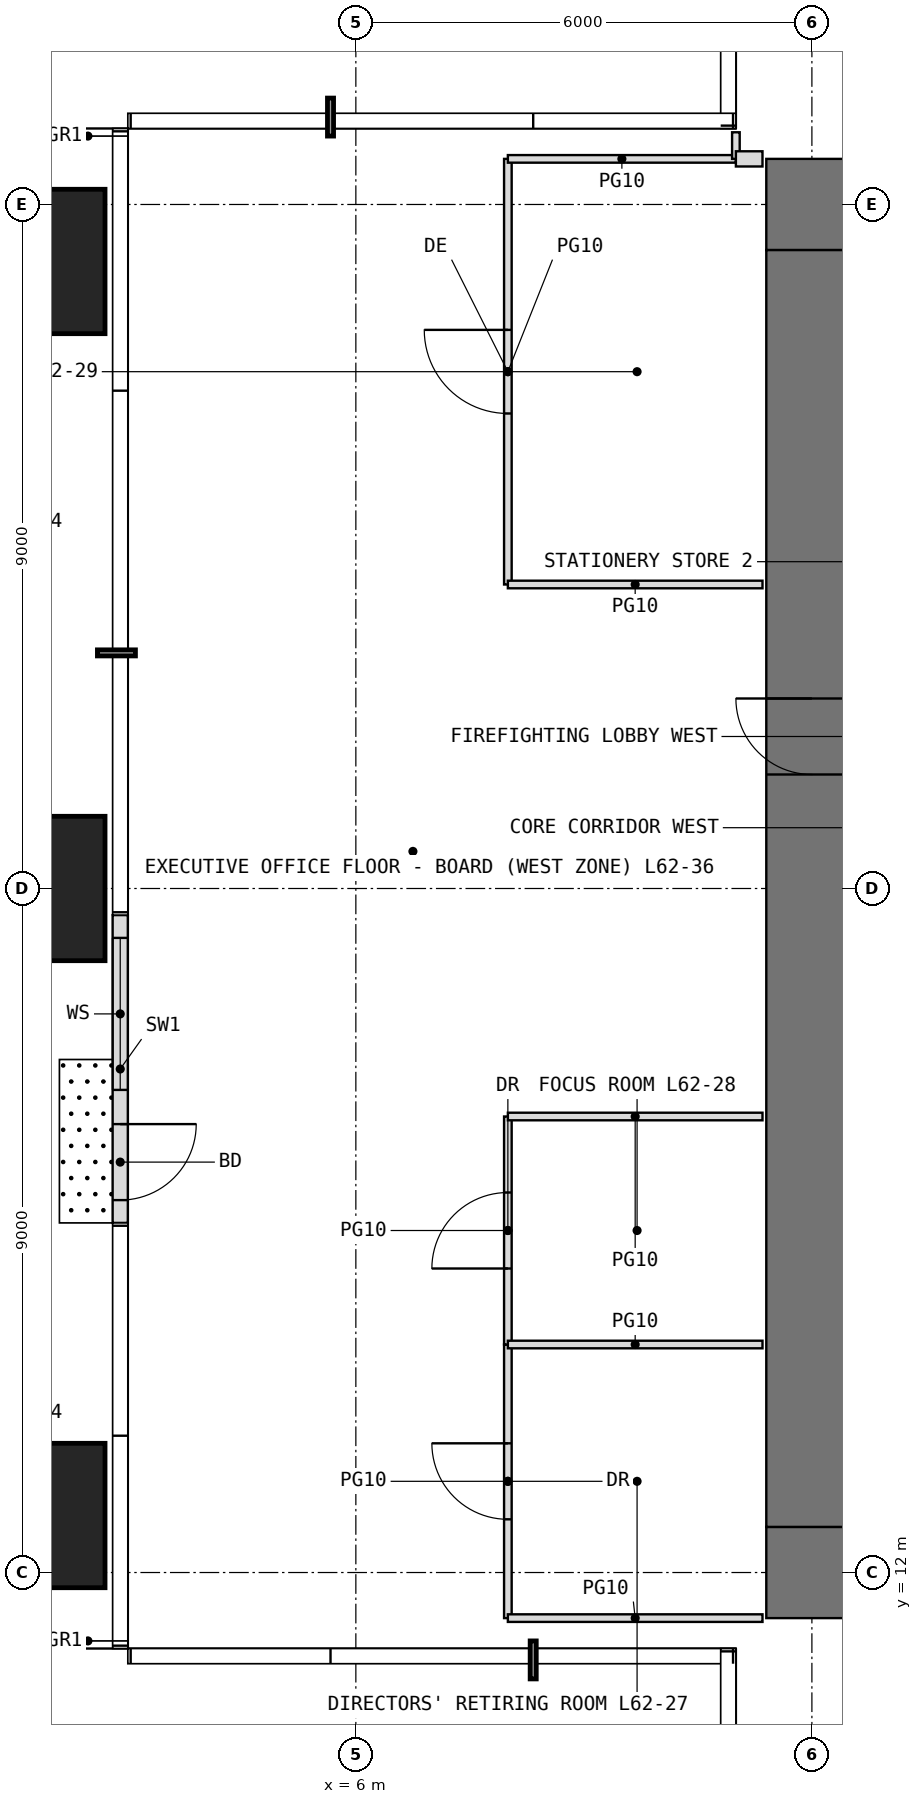
"""IFC4 building model, lengths in metres.
Left out: names, types, materials, properties, quantities, classifications, styles, units other than length and angle.
Written with IfcOpenShell. Run it as: python <this file> out.ifc"""

import sys

from ifc_helpers import new_model, si_unit, direction, frame, frame_2d, origin, origin_2d, place, context, subcontext, project, spatial, rectangle, extrude, element, fill, save


model = new_model("IFC4")
c1 = context("Model", 3, precision=1e-05, world=origin(), true_north=direction((0.0, 1.0)))
c2 = subcontext(c1, "Body", "Model", "MODEL_VIEW")
j1 = project(units=[si_unit("LENGTHUNIT", "METRE"), si_unit("PLANEANGLEUNIT", "RADIAN")], contexts=[c1])
p1 = place(None, origin())
s1 = spatial("IfcSite", under=j1, at=p1, CompositionType="ELEMENT")
p2 = place(p1, origin())
s2 = spatial("IfcBuilding", under=s1, at=p2, CompositionType="ELEMENT")
p3 = place(p2, frame((0.0, 0.0, 260.8)))
s3 = spatial("IfcBuildingStorey", under=s2, at=p3, CompositionType="ELEMENT", Elevation=260.8)
for number, where, z_axis, x_axis in (
    (1, (1.75, 12.75, 0.0), (0.0, 0.0, 1.0), (1.0, 0.0, 0.0)),
    (2, (1.75, 21.0, 0.0), (0.0, 0.0, 1.0), (1.0, 0.0, 0.0)),
    (3, (1.75, 29.25, 0.0), (0.0, 0.0, 1.0), (1.0, 0.0, 0.0)),
):
    element("IfcColumn", number, at=place(p3, frame(where, z_axis=z_axis, x_axis=x_axis)), inside=s3, PredefinedType="COLUMN", context=c2, shape_type="SweptSolid", body=[
        extrude(rectangle(XDim=1.9, YDim=1.9, at=origin_2d()), origin(), (0.0, 0.0, 1.0), 4.2),
    ])
p4 = place(p3, frame((2.9, 20.65, 0.0), z_axis=(0.0, 0.0, 1.0), x_axis=(0.0, -1.0, 0.0)))
e4 = element("IfcWall", 4, at=p4, inside=s3, PredefinedType="USERDEFINED", context=c2, shape_type="SweptSolid", body=[
    extrude(rectangle(XDim=4.05, YDim=0.2, at=frame_2d((2.025, 0.0))), origin(), (0.0, 0.0, 1.0), 3.95),
])
p5 = place(p4, frame((2.75, 0.0, 0.0)))
e5 = element("IfcOpeningElement", 5, at=p5, cuts=e4, PredefinedType="OPENING", context=c2, shape_type="SweptSolid", body=[
    extrude(rectangle(XDim=1.0, YDim=2.4, at=frame_2d((0.5, 1.2))), frame((0.0, 0.11, 0.0), z_axis=(0.0, -1.0, 0.0), x_axis=(1.0, 0.0, 0.0)), (0.0, 0.0, 1.0), 0.22),
])
p6 = place(p4, frame((0.3, 0.0, 0.3)))
e6 = element("IfcOpeningElement", 6, at=p6, cuts=e4, PredefinedType="OPENING", context=c2, shape_type="SweptSolid", body=[
    extrude(rectangle(XDim=2.0, YDim=2.7, at=frame_2d((1.0, 1.35))), frame((0.0, 0.11, 0.0), z_axis=(0.0, -1.0, 0.0), x_axis=(1.0, 0.0, 0.0)), (0.0, 0.0, 1.0), 0.22),
])
p7 = place(p3, frame((11.4, 12.0, -0.05), z_axis=(0.0, 0.0, 1.0), x_axis=(1.0, 0.0, 0.0)))
e7 = element("IfcWall", 7, at=p7, inside=s3, PredefinedType="SHEAR", context=c2, shape_type="SweptSolid", body=[
    extrude(rectangle(XDim=19.2, YDim=1.2, at=frame_2d((9.6, 0.0))), origin(), (0.0, 0.0, 1.0), 4.2),
])
p8 = place(p7, frame((8.6, 0.0, 0.05)))
e8 = element("IfcOpeningElement", 8, at=p8, cuts=e7, PredefinedType="OPENING", context=c2, shape_type="SweptSolid", body=[
    extrude(rectangle(XDim=2.0, YDim=2.2, at=frame_2d((1.0, 1.1))), frame((0.0, 0.61, 0.0), z_axis=(0.0, -1.0, 0.0), x_axis=(1.0, 0.0, 0.0)), (0.0, 0.0, 1.0), 1.22),
])
p9 = place(p3, frame((11.4, 30.0, -0.05), z_axis=(0.0, 0.0, 1.0), x_axis=(1.0, 0.0, 0.0)))
e9 = element("IfcWall", 9, at=p9, inside=s3, PredefinedType="SHEAR", context=c2, shape_type="SweptSolid", body=[
    extrude(rectangle(XDim=19.2, YDim=1.2, at=frame_2d((9.6, 0.0))), origin(), (0.0, 0.0, 1.0), 4.2),
])
p10 = place(p9, frame((8.6, 0.0, 0.05)))
e10 = element("IfcOpeningElement", 10, at=p10, cuts=e9, PredefinedType="OPENING", context=c2, shape_type="SweptSolid", body=[
    extrude(rectangle(XDim=2.0, YDim=2.2, at=frame_2d((1.0, 1.1))), frame((0.0, 0.61, 0.0), z_axis=(0.0, -1.0, 0.0), x_axis=(1.0, 0.0, 0.0)), (0.0, 0.0, 1.0), 1.22),
])
p11 = place(p3, frame((12.0, 12.6, -0.05), z_axis=(0.0, 0.0, 1.0), x_axis=(0.0, 1.0, 0.0)))
e11 = element("IfcWall", 11, at=p11, inside=s3, PredefinedType="SHEAR", context=c2, shape_type="SweptSolid", body=[
    extrude(rectangle(XDim=16.8, YDim=1.2, at=frame_2d((8.4, 0.0))), origin(), (0.0, 0.0, 1.0), 4.2),
])
p12 = place(p11, frame((9.9, 0.0, 0.05)))
e12 = element("IfcOpeningElement", 12, at=p12, cuts=e11, PredefinedType="OPENING", context=c2, shape_type="SweptSolid", body=[
    extrude(rectangle(XDim=1.0, YDim=2.2, at=frame_2d((0.5, 1.1))), frame((0.0, 0.61, 0.0), z_axis=(0.0, -1.0, 0.0), x_axis=(1.0, 0.0, 0.0)), (0.0, 0.0, 1.0), 1.22),
])
p13 = place(p3, frame((8.0, 11.4, 0.0), z_axis=(0.0, 0.0, 1.0), x_axis=(0.0, 1.0, 0.0)))
e13 = element("IfcWall", 13, at=p13, inside=s3, PredefinedType="PARTITIONING", context=c2, shape_type="SweptSolid", body=[
    extrude(rectangle(XDim=3.6, YDim=0.1, at=frame_2d((1.8, 0.0))), origin(), (0.0, 0.0, 1.0), 3.95),
])
p14 = place(p13, frame((1.3, 0.0, 0.0)))
e14 = element("IfcOpeningElement", 14, at=p14, cuts=e13, PredefinedType="OPENING", context=c2, shape_type="SweptSolid", body=[
    extrude(rectangle(XDim=1.0, YDim=2.2, at=frame_2d((0.5, 1.1))), frame((0.0, 0.06, 0.0), z_axis=(0.0, -1.0, 0.0), x_axis=(1.0, 0.0, 0.0)), (0.0, 0.0, 1.0), 0.12),
])
p15 = place(p3, frame((8.0, 11.4, 0.0), z_axis=(0.0, 0.0, 1.0), x_axis=(1.0, 0.0, 0.0)))
e15 = element("IfcWall", 15, at=p15, inside=s3, PredefinedType="PARTITIONING", context=c2, shape_type="SweptSolid", body=[
    extrude(rectangle(XDim=3.35, YDim=0.1, at=frame_2d((1.675, 0.0))), origin(), (0.0, 0.0, 1.0), 3.95),
])
p16 = place(p3, frame((8.0, 15.0, 0.0), z_axis=(0.0, 0.0, 1.0), x_axis=(0.0, 1.0, 0.0)))
e16 = element("IfcWall", 16, at=p16, inside=s3, PredefinedType="PARTITIONING", context=c2, shape_type="SweptSolid", body=[
    extrude(rectangle(XDim=3.0, YDim=0.1, at=frame_2d((1.5, 0.0))), origin(), (0.0, 0.0, 1.0), 3.95),
])
p17 = place(p16, frame((1.0, 0.0, 0.0)))
e17 = element("IfcOpeningElement", 17, at=p17, cuts=e16, PredefinedType="OPENING", context=c2, shape_type="SweptSolid", body=[
    extrude(rectangle(XDim=1.0, YDim=2.2, at=frame_2d((0.5, 1.1))), frame((0.0, 0.06, 0.0), z_axis=(0.0, -1.0, 0.0), x_axis=(1.0, 0.0, 0.0)), (0.0, 0.0, 1.0), 0.12),
])
for number, where, z_axis, x_axis in (
    (18, (8.0, 15.0, 0.0), (0.0, 0.0, 1.0), (1.0, 0.0, 0.0)),
    (19, (8.0, 18.0, 0.0), (0.0, 0.0, 1.0), (1.0, 0.0, 0.0)),
):
    element("IfcWall", number, at=place(p3, frame(where, z_axis=z_axis, x_axis=x_axis)), inside=s3, PredefinedType="PARTITIONING", context=c2, shape_type="SweptSolid", body=[
        extrude(rectangle(XDim=3.35, YDim=0.1, at=frame_2d((1.675, 0.0))), origin(), (0.0, 0.0, 1.0), 3.95),
    ])
p18 = place(p3, frame((8.0, 25.0, 0.0), z_axis=(0.0, 0.0, 1.0), x_axis=(0.0, 1.0, 0.0)))
e20 = element("IfcWall", 20, at=p18, inside=s3, PredefinedType="PARTITIONING", context=c2, shape_type="SweptSolid", body=[
    extrude(rectangle(XDim=5.6, YDim=0.1, at=frame_2d((2.8, 0.0))), origin(), (0.0, 0.0, 1.0), 3.95),
])
p19 = place(p18, frame((2.25, 0.0, 0.0)))
e21 = element("IfcOpeningElement", 21, at=p19, cuts=e20, PredefinedType="OPENING", context=c2, shape_type="SweptSolid", body=[
    extrude(rectangle(XDim=1.1, YDim=2.3, at=frame_2d((0.55, 1.15))), frame((0.0, 0.06, 0.0), z_axis=(0.0, -1.0, 0.0), x_axis=(1.0, 0.0, 0.0)), (0.0, 0.0, 1.0), 0.12),
])
p20 = place(p3, frame((8.0, 25.0, 0.0), z_axis=(0.0, 0.0, 1.0), x_axis=(1.0, 0.0, 0.0)))
e22 = element("IfcWall", 22, at=p20, inside=s3, PredefinedType="PARTITIONING", context=c2, shape_type="SweptSolid", body=[
    extrude(rectangle(XDim=3.35, YDim=0.1, at=frame_2d((1.675, 0.0))), origin(), (0.0, 0.0, 1.0), 3.95),
])
p21 = place(p3, frame((8.0, 30.6, 0.0), z_axis=(0.0, 0.0, 1.0), x_axis=(1.0, 0.0, 0.0)))
e23 = element("IfcWall", 23, at=p21, inside=s3, PredefinedType="PARTITIONING", context=c2, shape_type="SweptSolid", body=[
    extrude(rectangle(XDim=3.0, YDim=0.1, at=frame_2d((1.5, 0.0))), origin(), (0.0, 0.0, 1.0), 3.95),
])
p22 = place(p3, frame((11.0, 30.6, 0.0), z_axis=(0.0, 0.0, 1.0), x_axis=(0.0, 1.0, 0.0)))
e24 = element("IfcWall", 24, at=p22, inside=s3, PredefinedType="PARTITIONING", context=c2, shape_type="SweptSolid", body=[
    extrude(rectangle(XDim=0.35, YDim=0.1, at=frame_2d((0.175, 0.0))), origin(), (0.0, 0.0, 1.0), 3.95),
])
p23 = place(p3, frame((11.0, 30.6, 0.0), z_axis=(0.0, 0.0, 1.0), x_axis=(1.0, 0.0, 0.0)))
e25 = element("IfcWall", 25, at=p23, inside=s3, PredefinedType="PARTITIONING", context=c2, shape_type="SweptSolid", body=[
    extrude(rectangle(XDim=0.35, YDim=0.2, at=frame_2d((0.175, 0.0))), origin(), (0.0, 0.0, 1.0), 3.95),
])
p24 = place(p5, origin())
e26 = element("IfcDoor", 26, at=p24, inside=s3, OperationType="SINGLE_SWING_LEFT", PredefinedType="DOOR", context=c2, shape_type="SweptSolid", body=[
    extrude(rectangle(XDim=1.0, YDim=2.4, at=frame_2d((0.5, 1.2))), frame((0.0, 0.025, 0.0), z_axis=(0.0, -1.0, 0.0), x_axis=(1.0, 0.0, 0.0)), (0.0, 0.0, 1.0), 0.05),
])
fill(e5, e26)
p25 = place(p6, origin())
e27 = element("IfcWindow", 27, at=p25, inside=s3, PartitioningType="SINGLE_PANEL", PredefinedType="WINDOW", context=c2, shape_type="SweptSolid", body=[
    extrude(rectangle(XDim=2.0, YDim=2.7, at=frame_2d((1.0, 1.35))), frame((0.0, 0.03, 0.0), z_axis=(0.0, -1.0, 0.0), x_axis=(1.0, 0.0, 0.0)), (0.0, 0.0, 1.0), 0.06),
])
fill(e6, e27)
p26 = place(p12, origin())
e28 = element("IfcDoor", 28, at=p26, inside=s3, OperationType="SINGLE_SWING_RIGHT", PredefinedType="DOOR", context=c2, shape_type="SweptSolid", body=[
    extrude(rectangle(XDim=1.0, YDim=2.2, at=frame_2d((0.5, 1.1))), frame((0.0, 0.025, 0.0), z_axis=(0.0, -1.0, 0.0), x_axis=(1.0, 0.0, 0.0)), (0.0, 0.0, 1.0), 0.05),
])
fill(e12, e28)
p27 = place(p14, origin())
e29 = element("IfcDoor", 29, at=p27, inside=s3, OperationType="SINGLE_SWING_RIGHT", PredefinedType="DOOR", context=c2, shape_type="SweptSolid", body=[
    extrude(rectangle(XDim=1.0, YDim=2.2, at=frame_2d((0.5, 1.1))), frame((0.0, 0.025, 0.0), z_axis=(0.0, -1.0, 0.0), x_axis=(1.0, 0.0, 0.0)), (0.0, 0.0, 1.0), 0.05),
])
fill(e14, e29)
p28 = place(p17, origin())
e30 = element("IfcDoor", 30, at=p28, inside=s3, OperationType="SINGLE_SWING_LEFT", PredefinedType="DOOR", context=c2, shape_type="SweptSolid", body=[
    extrude(rectangle(XDim=1.0, YDim=2.2, at=frame_2d((0.5, 1.1))), frame((0.0, 0.025, 0.0), z_axis=(0.0, -1.0, 0.0), x_axis=(1.0, 0.0, 0.0)), (0.0, 0.0, 1.0), 0.05),
])
fill(e17, e30)
p29 = place(p19, origin())
e31 = element("IfcDoor", 31, at=p29, inside=s3, OperationType="SINGLE_SWING_RIGHT", PredefinedType="DOOR", context=c2, shape_type="SweptSolid", body=[
    extrude(rectangle(XDim=1.1, YDim=2.3, at=frame_2d((0.55, 1.15))), frame((0.0, 0.025, 0.0), z_axis=(0.0, -1.0, 0.0), x_axis=(1.0, 0.0, 0.0)), (0.0, 0.0, 1.0), 0.05),
])
fill(e21, e31)
save(model, sys.argv[1])
